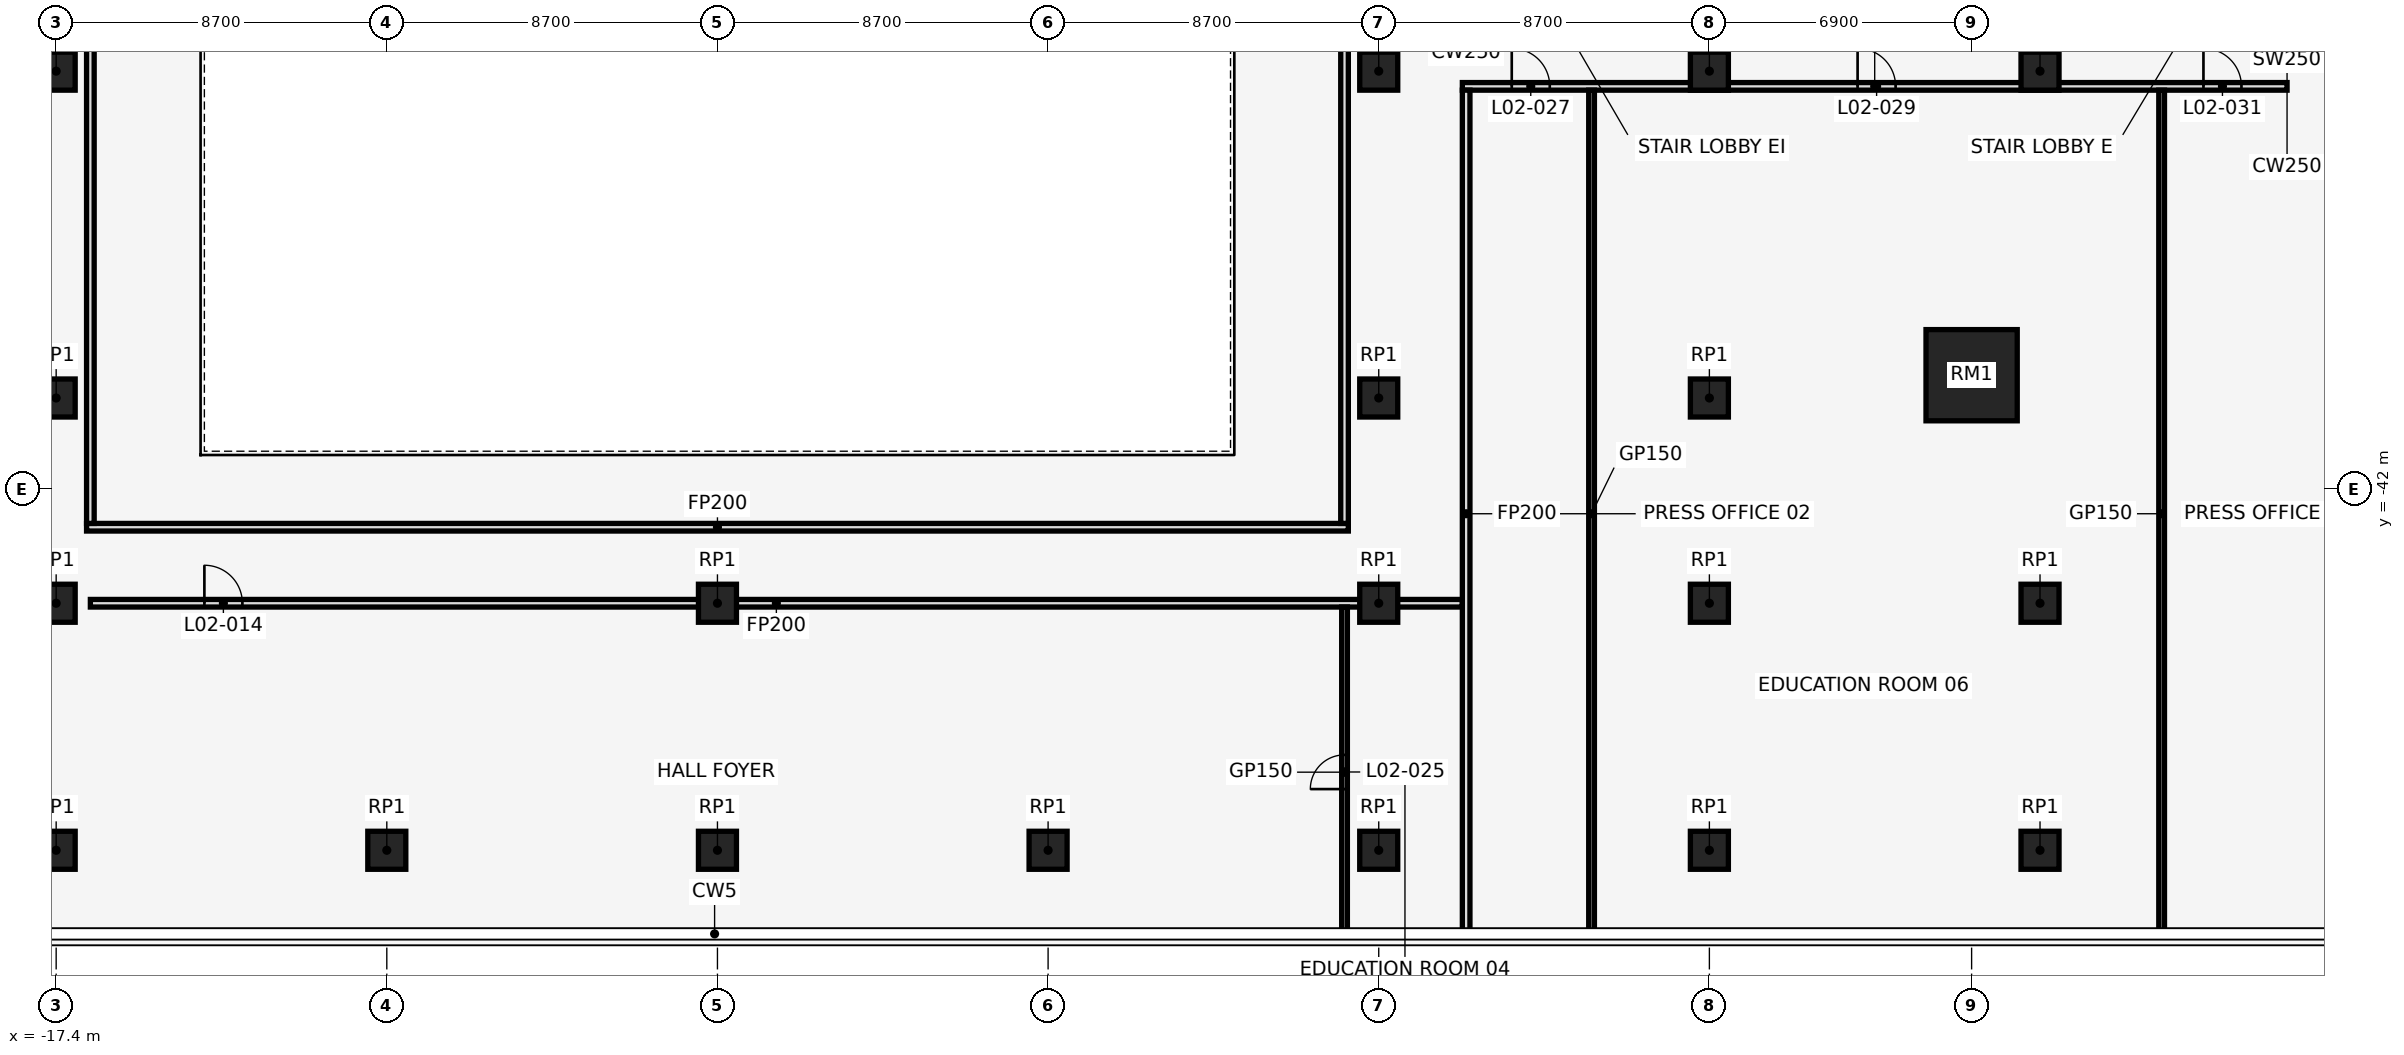
"""IFC4 building model, lengths in metres.
Left out: names, types, materials, properties, quantities, classifications, styles, units other than length and angle.
Written with IfcOpenShell. Run it as: python <this file> out.ifc"""

import sys

from ifc_helpers import new_model, si_unit, direction, frame, frame_2d, origin, origin_2d, place, context, subcontext, project, spatial, rectangle, extrude, element, fill, save


model = new_model("IFC4")
c1 = context("Model", 3, precision=1e-05, world=origin(), true_north=direction((0.0, 1.0)))
c2 = subcontext(c1, "Body", "Model", "MODEL_VIEW")
j1 = project(units=[si_unit("LENGTHUNIT", "METRE"), si_unit("PLANEANGLEUNIT", "RADIAN")], contexts=[c1])
p1 = place(None, origin())
s1 = spatial("IfcSite", under=j1, at=p1, CompositionType="ELEMENT")
p2 = place(p1, origin())
s2 = spatial("IfcBuilding", under=s1, at=p2, CompositionType="ELEMENT")
p3 = place(p2, frame((0.0, 0.0, 14.0)))
s3 = spatial("IfcBuildingStorey", under=s2, at=p3, CompositionType="ELEMENT", Elevation=14.0)
for number, where, z_axis, x_axis in (
    (1, (-17.4, -39.6, 0.0), (0.0, 0.0, 1.0), (1.0, 0.0, 0.0)),
    (2, (17.4, -39.6, 0.0), (0.0, 0.0, 1.0), (1.0, 0.0, 0.0)),
    (3, (26.1, -39.6, 0.0), (0.0, 0.0, 1.0), (1.0, 0.0, 0.0)),
):
    element("IfcColumn", number, at=place(p3, frame(where, z_axis=z_axis, x_axis=x_axis)), inside=s3, PredefinedType="COLUMN", context=c2, shape_type="SweptSolid", body=[
        extrude(rectangle(XDim=1.0, YDim=1.0, at=origin_2d()), origin(), (0.0, 0.0, 1.0), 6.0),
    ])
p4 = place(p3, frame((33.0, -39.0, 0.0), z_axis=(0.0, 0.0, 1.0), x_axis=(1.0, 0.0, 0.0)))
e4 = element("IfcColumn", 4, at=p4, inside=s3, PredefinedType="COLUMN", context=c2, shape_type="SweptSolid", body=[
    extrude(rectangle(XDim=2.4, YDim=2.4, at=origin_2d()), origin(), (0.0, 0.0, 1.0), 6.0),
])
for number, where, z_axis, x_axis in (
    (5, (-17.4, -31.0, 0.0), (0.0, 0.0, 1.0), (1.0, 0.0, 0.0)),
    (6, (-17.4, -45.0, 0.0), (0.0, 0.0, 1.0), (1.0, 0.0, 0.0)),
    (7, (-17.4, -51.5, 0.0), (0.0, 0.0, 1.0), (1.0, 0.0, 0.0)),
    (8, (-8.7, -51.5, 0.0), (0.0, 0.0, 1.0), (1.0, 0.0, 0.0)),
    (9, (0.0, -45.0, 0.0), (0.0, 0.0, 1.0), (1.0, 0.0, 0.0)),
    (10, (0.0, -51.5, 0.0), (0.0, 0.0, 1.0), (1.0, 0.0, 0.0)),
    (11, (8.7, -51.5, 0.0), (0.0, 0.0, 1.0), (1.0, 0.0, 0.0)),
    (12, (17.4, -31.0, 0.0), (0.0, 0.0, 1.0), (1.0, 0.0, 0.0)),
    (13, (17.4, -45.0, 0.0), (0.0, 0.0, 1.0), (1.0, 0.0, 0.0)),
    (14, (17.4, -51.5, 0.0), (0.0, 0.0, 1.0), (1.0, 0.0, 0.0)),
    (15, (26.1, -31.0, 0.0), (0.0, 0.0, 1.0), (1.0, 0.0, 0.0)),
    (16, (26.1, -45.0, 0.0), (0.0, 0.0, 1.0), (1.0, 0.0, 0.0)),
    (17, (26.1, -51.5, 0.0), (0.0, 0.0, 1.0), (1.0, 0.0, 0.0)),
    (18, (34.8, -31.0, 0.0), (0.0, 0.0, 1.0), (1.0, 0.0, 0.0)),
    (19, (34.8, -45.0, 0.0), (0.0, 0.0, 1.0), (1.0, 0.0, 0.0)),
    (20, (34.8, -51.5, 0.0), (0.0, 0.0, 1.0), (1.0, 0.0, 0.0)),
):
    element("IfcColumn", number, at=place(p3, frame(where, z_axis=z_axis, x_axis=x_axis)), inside=s3, PredefinedType="COLUMN", context=c2, shape_type="SweptSolid", body=[
        extrude(rectangle(XDim=1.0, YDim=1.0, at=origin_2d()), origin(), (0.0, 0.0, 1.0), 6.0),
    ])
p5 = place(p3, frame((-16.5, -45.0, 0.0), z_axis=(0.0, 0.0, 1.0), x_axis=(1.0, 0.0, 0.0)))
e21 = element("IfcWall", 21, at=p5, inside=s3, PredefinedType="PARTITIONING", context=c2, shape_type="SweptSolid", body=[
    extrude(rectangle(XDim=36.1, YDim=0.2, at=frame_2d((18.05, 0.0))), origin(), (0.0, 0.0, 1.0), 5.7),
])
p6 = place(p5, frame((3.0, 0.0, 0.0)))
e22 = element("IfcOpeningElement", 22, at=p6, cuts=e21, PredefinedType="OPENING", context=c2, shape_type="SweptSolid", body=[
    extrude(rectangle(XDim=1.0, YDim=2.1, at=frame_2d((0.5, 1.05))), frame((0.0, 0.112, 0.0), z_axis=(0.0, -1.0, 0.0), x_axis=(1.0, 0.0, 0.0)), (0.0, 0.0, 1.0), 0.224),
])
p7 = place(p3, frame((-16.6, -43.0, 0.0), z_axis=(0.0, 0.0, 1.0), x_axis=(1.0, 0.0, 0.0)))
e23 = element("IfcWall", 23, at=p7, inside=s3, PredefinedType="PARTITIONING", context=c2, shape_type="SweptSolid", body=[
    extrude(rectangle(XDim=33.2, YDim=0.2, at=frame_2d((16.6, 0.0))), origin(), (0.0, 0.0, 1.0), 5.7),
])
p8 = place(p3, frame((19.6, -31.4, 0.0), z_axis=(0.0, 0.0, 1.0), x_axis=(1.0, 0.0, 0.0)))
e24 = element("IfcWall", 24, at=p8, inside=s3, PredefinedType="PARTITIONING", context=c2, shape_type="SweptSolid", body=[
    extrude(rectangle(XDim=21.7, YDim=0.2, at=frame_2d((10.85, 0.0))), origin(), (0.0, 0.0, 1.0), 5.7),
])
p9 = place(p8, frame((1.3, 0.0, 0.0)))
e25 = element("IfcOpeningElement", 25, at=p9, cuts=e24, PredefinedType="OPENING", context=c2, shape_type="SweptSolid", body=[
    extrude(rectangle(XDim=1.0, YDim=2.1, at=frame_2d((0.5, 1.05))), frame((0.0, 0.112, 0.0), z_axis=(0.0, -1.0, 0.0), x_axis=(1.0, 0.0, 0.0)), (0.0, 0.0, 1.0), 0.224),
])
p10 = place(p8, frame((10.4, 0.0, 0.0)))
e26 = element("IfcOpeningElement", 26, at=p10, cuts=e24, PredefinedType="OPENING", context=c2, shape_type="SweptSolid", body=[
    extrude(rectangle(XDim=1.0, YDim=2.1, at=frame_2d((0.5, 1.05))), frame((0.0, 0.112, 0.0), z_axis=(0.0, -1.0, 0.0), x_axis=(1.0, 0.0, 0.0)), (0.0, 0.0, 1.0), 0.224),
])
p11 = place(p8, frame((19.5, 0.0, 0.0)))
e27 = element("IfcOpeningElement", 27, at=p11, cuts=e24, PredefinedType="OPENING", context=c2, shape_type="SweptSolid", body=[
    extrude(rectangle(XDim=1.0, YDim=2.1, at=frame_2d((0.5, 1.05))), frame((0.0, 0.112, 0.0), z_axis=(0.0, -1.0, 0.0), x_axis=(1.0, 0.0, 0.0)), (0.0, 0.0, 1.0), 0.224),
])
p12 = place(p3, frame((-16.5, -42.9, 0.0), z_axis=(0.0, 0.0, 1.0), x_axis=(0.0, 1.0, 0.0)))
e28 = element("IfcWall", 28, at=p12, inside=s3, PredefinedType="PARTITIONING", context=c2, shape_type="SweptSolid", body=[
    extrude(rectangle(XDim=27.4, YDim=0.2, at=frame_2d((13.7, 0.0))), origin(), (0.0, 0.0, 1.0), 5.7),
])
p13 = place(p3, frame((16.5, -53.79, 0.0), z_axis=(0.0, 0.0, 1.0), x_axis=(0.0, 1.0, 0.0)))
e29 = element("IfcWall", 29, at=p13, inside=s3, PredefinedType="PARTITIONING", context=c2, shape_type="SweptSolid", body=[
    extrude(rectangle(XDim=8.69, YDim=0.15, at=frame_2d((4.345, 0.0))), origin(), (0.0, 0.0, 1.0), 5.7),
])
p14 = place(p13, frame((3.9, 0.0, 0.0)))
e30 = element("IfcOpeningElement", 30, at=p14, cuts=e29, PredefinedType="OPENING", context=c2, shape_type="SweptSolid", body=[
    extrude(rectangle(XDim=0.9, YDim=2.1, at=frame_2d((0.45, 1.05))), frame((0.0, 0.087, 0.0), z_axis=(0.0, -1.0, 0.0), x_axis=(1.0, 0.0, 0.0)), (0.0, 0.0, 1.0), 0.174),
])
p15 = place(p3, frame((16.5, -42.9, 0.0), z_axis=(0.0, 0.0, 1.0), x_axis=(0.0, 1.0, 0.0)))
e31 = element("IfcWall", 31, at=p15, inside=s3, PredefinedType="PARTITIONING", context=c2, shape_type="SweptSolid", body=[
    extrude(rectangle(XDim=27.4, YDim=0.2, at=frame_2d((13.7, 0.0))), origin(), (0.0, 0.0, 1.0), 5.7),
])
p16 = place(p3, frame((19.7, -53.79, 0.0), z_axis=(0.0, 0.0, 1.0), x_axis=(0.0, 1.0, 0.0)))
e32 = element("IfcWall", 32, at=p16, inside=s3, PredefinedType="PARTITIONING", context=c2, shape_type="SweptSolid", body=[
    extrude(rectangle(XDim=22.29, YDim=0.2, at=frame_2d((11.145, 0.0))), origin(), (0.0, 0.0, 1.0), 5.7),
])
for number, where, z_axis, x_axis in (
    (33, (23.0, -53.79, 0.0), (0.0, 0.0, 1.0), (0.0, 1.0, 0.0)),
    (34, (38.0, -53.79, 0.0), (0.0, 0.0, 1.0), (0.0, 1.0, 0.0)),
):
    element("IfcWall", number, at=place(p3, frame(where, z_axis=z_axis, x_axis=x_axis)), inside=s3, PredefinedType="PARTITIONING", context=c2, shape_type="SweptSolid", body=[
        extrude(rectangle(XDim=22.29, YDim=0.15, at=frame_2d((11.145, 0.0))), origin(), (0.0, 0.0, 1.0), 5.7),
    ])
p17 = place(p6, frame((1.0, 0.0, 0.0), z_axis=(0.0, 0.0, 1.0), x_axis=(-1.0, 0.0, 0.0)))
e35 = element("IfcDoor", 35, at=p17, inside=s3, OperationType="SINGLE_SWING_RIGHT", PredefinedType="DOOR", context=c2, shape_type="SweptSolid", body=[
    extrude(rectangle(XDim=1.0, YDim=2.1, at=frame_2d((0.5, 1.05))), frame((0.0, 0.025, 0.0), z_axis=(0.0, -1.0, 0.0), x_axis=(1.0, 0.0, 0.0)), (0.0, 0.0, 1.0), 0.05),
])
fill(e22, e35)
p18 = place(p14, frame((0.9, 0.0, 0.0), z_axis=(0.0, 0.0, 1.0), x_axis=(-1.0, 0.0, 0.0)))
e36 = element("IfcDoor", 36, at=p18, inside=s3, OperationType="SINGLE_SWING_LEFT", PredefinedType="DOOR", context=c2, shape_type="SweptSolid", body=[
    extrude(rectangle(XDim=0.9, YDim=2.1, at=frame_2d((0.45, 1.05))), frame((0.0, 0.025, 0.0), z_axis=(0.0, -1.0, 0.0), x_axis=(1.0, 0.0, 0.0)), (0.0, 0.0, 1.0), 0.05),
])
fill(e30, e36)
p19 = place(p9, frame((1.0, 0.0, 0.0), z_axis=(0.0, 0.0, 1.0), x_axis=(-1.0, 0.0, 0.0)))
e37 = element("IfcDoor", 37, at=p19, inside=s3, OperationType="SINGLE_SWING_RIGHT", PredefinedType="DOOR", context=c2, shape_type="SweptSolid", body=[
    extrude(rectangle(XDim=1.0, YDim=2.1, at=frame_2d((0.5, 1.05))), frame((0.0, 0.025, 0.0), z_axis=(0.0, -1.0, 0.0), x_axis=(1.0, 0.0, 0.0)), (0.0, 0.0, 1.0), 0.05),
])
fill(e25, e37)
p20 = place(p10, frame((1.0, 0.0, 0.0), z_axis=(0.0, 0.0, 1.0), x_axis=(-1.0, 0.0, 0.0)))
e38 = element("IfcDoor", 38, at=p20, inside=s3, OperationType="SINGLE_SWING_RIGHT", PredefinedType="DOOR", context=c2, shape_type="SweptSolid", body=[
    extrude(rectangle(XDim=1.0, YDim=2.1, at=frame_2d((0.5, 1.05))), frame((0.0, 0.025, 0.0), z_axis=(0.0, -1.0, 0.0), x_axis=(1.0, 0.0, 0.0)), (0.0, 0.0, 1.0), 0.05),
])
fill(e26, e38)
p21 = place(p11, frame((1.0, 0.0, 0.0), z_axis=(0.0, 0.0, 1.0), x_axis=(-1.0, 0.0, 0.0)))
e39 = element("IfcDoor", 39, at=p21, inside=s3, OperationType="SINGLE_SWING_LEFT", PredefinedType="DOOR", context=c2, shape_type="SweptSolid", body=[
    extrude(rectangle(XDim=1.0, YDim=2.1, at=frame_2d((0.5, 1.05))), frame((0.0, 0.025, 0.0), z_axis=(0.0, -1.0, 0.0), x_axis=(1.0, 0.0, 0.0)), (0.0, 0.0, 1.0), 0.05),
])
fill(e27, e39)
save(model, sys.argv[1])
